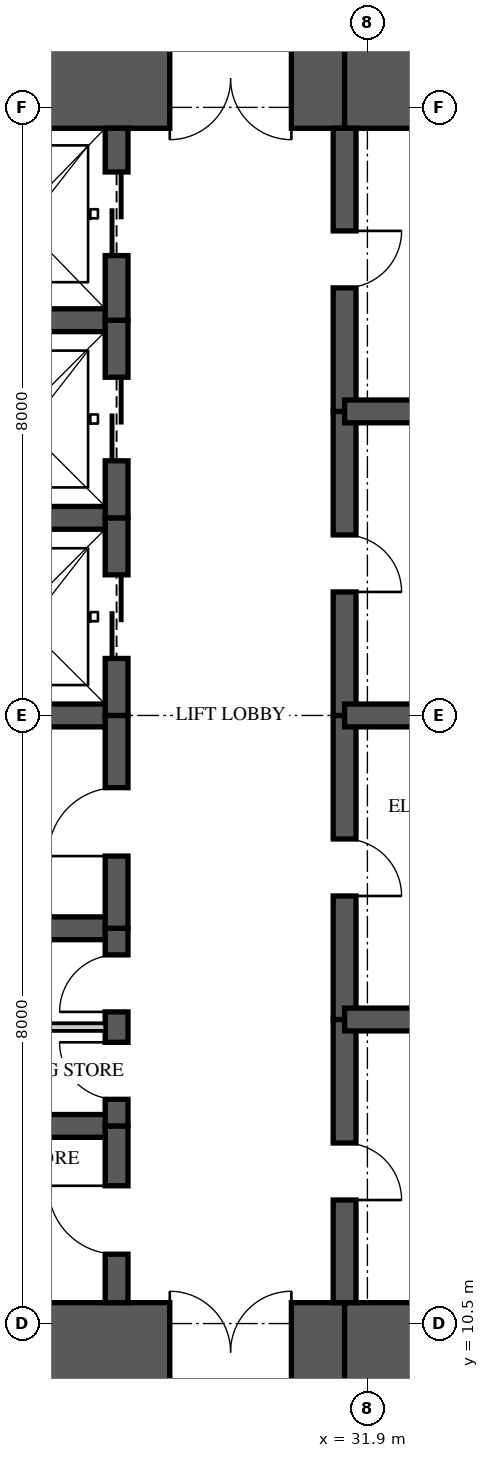
"""IFC4 building model, lengths in metres.
Left out: names, types, materials, properties, quantities, classifications, styles, units other than length and angle.
Written with IfcOpenShell. Run it as: python <this file> out.ifc"""

import sys

from ifc_helpers import new_model, si_unit, direction, frame, frame_2d, origin, place, context, subcontext, project, spatial, rectangle, extrude, element, fill, save


model = new_model("IFC4")
c1 = context("Model", 3, precision=1e-05, world=origin(), true_north=direction((0.0, 1.0)))
c2 = subcontext(c1, "Body", "Model", "MODEL_VIEW")
j1 = project(units=[si_unit("LENGTHUNIT", "METRE"), si_unit("PLANEANGLEUNIT", "RADIAN")], contexts=[c1])
p1 = place(None, origin())
s1 = spatial("IfcSite", under=j1, at=p1, CompositionType="ELEMENT")
p2 = place(p1, origin())
s2 = spatial("IfcBuilding", under=s1, at=p2, CompositionType="ELEMENT")
p3 = place(p2, frame((0.0, 0.0, 201.25)))
s3 = spatial("IfcBuildingStorey", under=s2, at=p3, CompositionType="ELEMENT", Elevation=201.25)
p4 = place(p3, frame((26.0, 10.125, 0.0), z_axis=(0.0, 0.0, 1.0), x_axis=(1.0, 0.0, 0.0)))
e1 = element("IfcWall", 1, at=p4, inside=s3, PredefinedType="SHEAR", context=c2, shape_type="SweptSolid", body=[
    extrude(rectangle(XDim=5.6, YDim=1.3, at=frame_2d((2.8, 0.0))), origin(), (0.0, 0.0, 1.0), 3.35),
])
p5 = place(p4, frame((3.3, 0.0, 0.0)))
e2 = element("IfcOpeningElement", 2, at=p5, cuts=e1, PredefinedType="OPENING", context=c2, shape_type="SweptSolid", body=[
    extrude(rectangle(XDim=1.6, YDim=2.1, at=frame_2d((0.8, 1.05))), frame((0.0, 0.66, 0.0), z_axis=(0.0, -1.0, 0.0), x_axis=(1.0, 0.0, 0.0)), (0.0, 0.0, 1.0), 1.32),
])
for number, where, z_axis, x_axis in (
    (3, (31.6, 10.125, 0.0), (0.0, 0.0, 1.0), (1.0, 0.0, 0.0)),
    (4, (35.9, 26.875, 0.0), (0.0, 0.0, 1.0), (-1.0, 0.0, 0.0)),
):
    element("IfcWall", number, at=place(p3, frame(where, z_axis=z_axis, x_axis=x_axis)), inside=s3, PredefinedType="SHEAR", context=c2, shape_type="SweptSolid", body=[
        extrude(rectangle(XDim=4.3, YDim=1.3, at=frame_2d((2.15, 0.0))), origin(), (0.0, 0.0, 1.0), 3.35),
    ])
p6 = place(p3, frame((31.6, 26.875, 0.0), z_axis=(0.0, 0.0, 1.0), x_axis=(-1.0, 0.0, 0.0)))
e5 = element("IfcWall", 5, at=p6, inside=s3, PredefinedType="SHEAR", context=c2, shape_type="SweptSolid", body=[
    extrude(rectangle(XDim=5.6, YDim=1.3, at=frame_2d((2.8, 0.0))), origin(), (0.0, 0.0, 1.0), 3.35),
])
p7 = place(p6, frame((0.7, 0.0, 0.0)))
e6 = element("IfcOpeningElement", 6, at=p7, cuts=e5, PredefinedType="OPENING", context=c2, shape_type="SweptSolid", body=[
    extrude(rectangle(XDim=1.6, YDim=2.1, at=frame_2d((0.8, 1.05))), frame((0.0, 0.66, 0.0), z_axis=(0.0, -1.0, 0.0), x_axis=(1.0, 0.0, 0.0)), (0.0, 0.0, 1.0), 1.32),
])
p8 = place(p3, frame((28.6, 10.775, 0.0), z_axis=(0.0, 0.0, 1.0), x_axis=(0.0, 1.0, 0.0)))
e7 = element("IfcWall", 7, at=p8, inside=s3, PredefinedType="SHEAR", context=c2, shape_type="SweptSolid", body=[
    extrude(rectangle(XDim=2.325, YDim=0.3, at=frame_2d((1.163, 0.0))), origin(), (0.0, 0.0, 1.0), 3.35),
])
p9 = place(p8, frame((0.637, 0.0, 0.0)))
e8 = element("IfcOpeningElement", 8, at=p9, cuts=e7, PredefinedType="OPENING", context=c2, shape_type="SweptSolid", body=[
    extrude(rectangle(XDim=0.9, YDim=2.1, at=frame_2d((0.45, 1.05))), frame((0.0, 0.16, 0.0), z_axis=(0.0, -1.0, 0.0), x_axis=(1.0, 0.0, 0.0)), (0.0, 0.0, 1.0), 0.32),
])
p10 = place(p3, frame((28.6, 13.1, 0.0), z_axis=(0.0, 0.0, 1.0), x_axis=(0.0, 1.0, 0.0)))
e9 = element("IfcWall", 9, at=p10, inside=s3, PredefinedType="SHEAR", context=c2, shape_type="SweptSolid", body=[
    extrude(rectangle(XDim=2.6, YDim=0.3, at=frame_2d((1.3, 0.0))), origin(), (0.0, 0.0, 1.0), 3.35),
])
p11 = place(p10, frame((0.35, 0.0, 0.0)))
e10 = element("IfcOpeningElement", 10, at=p11, cuts=e9, PredefinedType="OPENING", context=c2, shape_type="SweptSolid", body=[
    extrude(rectangle(XDim=0.75, YDim=2.1, at=frame_2d((0.375, 1.05))), frame((0.0, 0.16, 0.0), z_axis=(0.0, -1.0, 0.0), x_axis=(1.0, 0.0, 0.0)), (0.0, 0.0, 1.0), 0.32),
])
p12 = place(p10, frame((1.5, 0.0, 0.0)))
e11 = element("IfcOpeningElement", 11, at=p12, cuts=e9, PredefinedType="OPENING", context=c2, shape_type="SweptSolid", body=[
    extrude(rectangle(XDim=0.75, YDim=2.1, at=frame_2d((0.375, 1.05))), frame((0.0, 0.16, 0.0), z_axis=(0.0, -1.0, 0.0), x_axis=(1.0, 0.0, 0.0)), (0.0, 0.0, 1.0), 0.32),
])
p13 = place(p3, frame((28.6, 15.7, 0.0), z_axis=(0.0, 0.0, 1.0), x_axis=(0.0, 1.0, 0.0)))
e12 = element("IfcWall", 12, at=p13, inside=s3, PredefinedType="SHEAR", context=c2, shape_type="SweptSolid", body=[
    extrude(rectangle(XDim=2.8, YDim=0.3, at=frame_2d((1.4, 0.0))), origin(), (0.0, 0.0, 1.0), 3.35),
])
p14 = place(p13, frame((0.95, 0.0, 0.0)))
e13 = element("IfcOpeningElement", 13, at=p14, cuts=e12, PredefinedType="OPENING", context=c2, shape_type="SweptSolid", body=[
    extrude(rectangle(XDim=0.9, YDim=2.1, at=frame_2d((0.45, 1.05))), frame((0.0, 0.16, 0.0), z_axis=(0.0, -1.0, 0.0), x_axis=(1.0, 0.0, 0.0)), (0.0, 0.0, 1.0), 0.32),
])
p15 = place(p3, frame((28.6, 18.5, 0.0), z_axis=(0.0, 0.0, 1.0), x_axis=(0.0, 1.0, 0.0)))
e14 = element("IfcWall", 14, at=p15, inside=s3, PredefinedType="SHEAR", context=c2, shape_type="SweptSolid", body=[
    extrude(rectangle(XDim=2.6, YDim=0.3, at=frame_2d((1.3, 0.0))), origin(), (0.0, 0.0, 1.0), 3.35),
])
p16 = place(p15, frame((0.75, 0.0, 0.0)))
e15 = element("IfcOpeningElement", 15, at=p16, cuts=e14, PredefinedType="OPENING", context=c2, shape_type="SweptSolid", body=[
    extrude(rectangle(XDim=1.1, YDim=2.1, at=frame_2d((0.55, 1.05))), frame((0.0, 0.16, 0.0), z_axis=(0.0, -1.0, 0.0), x_axis=(1.0, 0.0, 0.0)), (0.0, 0.0, 1.0), 0.32),
])
p17 = place(p3, frame((28.6, 21.1, 0.0), z_axis=(0.0, 0.0, 1.0), x_axis=(0.0, 1.0, 0.0)))
e16 = element("IfcWall", 16, at=p17, inside=s3, PredefinedType="SHEAR", context=c2, shape_type="SweptSolid", body=[
    extrude(rectangle(XDim=2.6, YDim=0.3, at=frame_2d((1.3, 0.0))), origin(), (0.0, 0.0, 1.0), 3.35),
])
p18 = place(p17, frame((0.75, 0.0, 0.0)))
e17 = element("IfcOpeningElement", 17, at=p18, cuts=e16, PredefinedType="OPENING", context=c2, shape_type="SweptSolid", body=[
    extrude(rectangle(XDim=1.1, YDim=2.1, at=frame_2d((0.55, 1.05))), frame((0.0, 0.16, 0.0), z_axis=(0.0, -1.0, 0.0), x_axis=(1.0, 0.0, 0.0)), (0.0, 0.0, 1.0), 0.32),
])
p19 = place(p3, frame((28.6, 23.7, 0.0), z_axis=(0.0, 0.0, 1.0), x_axis=(0.0, 1.0, 0.0)))
e18 = element("IfcWall", 18, at=p19, inside=s3, PredefinedType="SHEAR", context=c2, shape_type="SweptSolid", body=[
    extrude(rectangle(XDim=2.525, YDim=0.3, at=frame_2d((1.263, 0.0))), origin(), (0.0, 0.0, 1.0), 3.35),
])
p20 = place(p19, frame((0.85, 0.0, 0.0)))
e19 = element("IfcOpeningElement", 19, at=p20, cuts=e18, PredefinedType="OPENING", context=c2, shape_type="SweptSolid", body=[
    extrude(rectangle(XDim=1.1, YDim=2.1, at=frame_2d((0.55, 1.05))), frame((0.0, 0.16, 0.0), z_axis=(0.0, -1.0, 0.0), x_axis=(1.0, 0.0, 0.0)), (0.0, 0.0, 1.0), 0.32),
])
p21 = place(p3, frame((31.6, 10.775, 0.0), z_axis=(0.0, 0.0, 1.0), x_axis=(0.0, 1.0, 0.0)))
e20 = element("IfcWall", 20, at=p21, inside=s3, PredefinedType="SHEAR", context=c2, shape_type="SweptSolid", body=[
    extrude(rectangle(XDim=3.725, YDim=0.3, at=frame_2d((1.863, 0.0))), origin(), (0.0, 0.0, 1.0), 3.35),
])
p22 = place(p21, frame((1.35, 0.0, 0.0)))
e21 = element("IfcOpeningElement", 21, at=p22, cuts=e20, PredefinedType="OPENING", context=c2, shape_type="SweptSolid", body=[
    extrude(rectangle(XDim=0.75, YDim=2.1, at=frame_2d((0.375, 1.05))), frame((0.0, 0.16, 0.0), z_axis=(0.0, -1.0, 0.0), x_axis=(1.0, 0.0, 0.0)), (0.0, 0.0, 1.0), 0.32),
])
p23 = place(p3, frame((31.6, 14.5, 0.0), z_axis=(0.0, 0.0, 1.0), x_axis=(0.0, 1.0, 0.0)))
e22 = element("IfcWall", 22, at=p23, inside=s3, PredefinedType="SHEAR", context=c2, shape_type="SweptSolid", body=[
    extrude(rectangle(XDim=4.0, YDim=0.3, at=frame_2d((2.0, 0.0))), origin(), (0.0, 0.0, 1.0), 3.35),
])
p24 = place(p23, frame((1.625, 0.0, 0.0)))
e23 = element("IfcOpeningElement", 23, at=p24, cuts=e22, PredefinedType="OPENING", context=c2, shape_type="SweptSolid", body=[
    extrude(rectangle(XDim=0.75, YDim=2.1, at=frame_2d((0.375, 1.05))), frame((0.0, 0.16, 0.0), z_axis=(0.0, -1.0, 0.0), x_axis=(1.0, 0.0, 0.0)), (0.0, 0.0, 1.0), 0.32),
])
p25 = place(p3, frame((31.6, 18.5, 0.0), z_axis=(0.0, 0.0, 1.0), x_axis=(0.0, 1.0, 0.0)))
e24 = element("IfcWall", 24, at=p25, inside=s3, PredefinedType="SHEAR", context=c2, shape_type="SweptSolid", body=[
    extrude(rectangle(XDim=4.0, YDim=0.3, at=frame_2d((2.0, 0.0))), origin(), (0.0, 0.0, 1.0), 3.35),
])
p26 = place(p25, frame((1.625, 0.0, 0.0)))
e25 = element("IfcOpeningElement", 25, at=p26, cuts=e24, PredefinedType="OPENING", context=c2, shape_type="SweptSolid", body=[
    extrude(rectangle(XDim=0.75, YDim=2.1, at=frame_2d((0.375, 1.05))), frame((0.0, 0.16, 0.0), z_axis=(0.0, -1.0, 0.0), x_axis=(1.0, 0.0, 0.0)), (0.0, 0.0, 1.0), 0.32),
])
p27 = place(p3, frame((31.6, 22.5, 0.0), z_axis=(0.0, 0.0, 1.0), x_axis=(0.0, 1.0, 0.0)))
e26 = element("IfcWall", 26, at=p27, inside=s3, PredefinedType="SHEAR", context=c2, shape_type="SweptSolid", body=[
    extrude(rectangle(XDim=3.725, YDim=0.3, at=frame_2d((1.863, 0.0))), origin(), (0.0, 0.0, 1.0), 3.35),
])
p28 = place(p27, frame((1.625, 0.0, 0.0)))
e27 = element("IfcOpeningElement", 27, at=p28, cuts=e26, PredefinedType="OPENING", context=c2, shape_type="SweptSolid", body=[
    extrude(rectangle(XDim=0.75, YDim=2.1, at=frame_2d((0.375, 1.05))), frame((0.0, 0.16, 0.0), z_axis=(0.0, -1.0, 0.0), x_axis=(1.0, 0.0, 0.0)), (0.0, 0.0, 1.0), 0.32),
])
for number, where, z_axis, x_axis in (
    (28, (26.0, 13.1, 0.0), (0.0, 0.0, 1.0), (1.0, 0.0, 0.0)),
    (29, (26.0, 15.7, 0.0), (0.0, 0.0, 1.0), (1.0, 0.0, 0.0)),
    (30, (26.0, 18.5, 0.0), (0.0, 0.0, 1.0), (1.0, 0.0, 0.0)),
    (31, (26.0, 21.1, 0.0), (0.0, 0.0, 1.0), (1.0, 0.0, 0.0)),
    (32, (26.0, 23.7, 0.0), (0.0, 0.0, 1.0), (1.0, 0.0, 0.0)),
):
    element("IfcWall", number, at=place(p3, frame(where, z_axis=z_axis, x_axis=x_axis)), inside=s3, PredefinedType="SHEAR", context=c2, shape_type="SweptSolid", body=[
        extrude(rectangle(XDim=2.6, YDim=0.3, at=frame_2d((1.3, 0.0))), origin(), (0.0, 0.0, 1.0), 3.35),
    ])
for number, where, z_axis, x_axis in (
    (33, (31.6, 14.5, 0.0), (0.0, 0.0, 1.0), (1.0, 0.0, 0.0)),
    (34, (31.6, 18.5, 0.0), (0.0, 0.0, 1.0), (1.0, 0.0, 0.0)),
    (35, (31.6, 22.5, 0.0), (0.0, 0.0, 1.0), (1.0, 0.0, 0.0)),
):
    element("IfcWall", number, at=place(p3, frame(where, z_axis=z_axis, x_axis=x_axis)), inside=s3, PredefinedType="SHEAR", context=c2, shape_type="SweptSolid", body=[
        extrude(rectangle(XDim=4.3, YDim=0.3, at=frame_2d((2.15, 0.0))), origin(), (0.0, 0.0, 1.0), 3.35),
    ])
p29 = place(p3, frame((26.15, 14.4, 0.0), z_axis=(0.0, 0.0, 1.0), x_axis=(1.0, 0.0, 0.0)))
e36 = element("IfcWall", 36, at=p29, inside=s3, PredefinedType="PARTITIONING", context=c2, shape_type="SweptSolid", body=[
    extrude(rectangle(XDim=2.3, YDim=0.1, at=frame_2d((1.15, 0.0))), origin(), (0.0, 0.0, 1.0), 3.11),
])
p30 = place(p16, origin())
e37 = element("IfcDoor", 37, at=p30, inside=s3, OperationType="SLIDING_TO_LEFT", PredefinedType="DOOR", context=c2, shape_type="SweptSolid", body=[
    extrude(rectangle(XDim=1.1, YDim=2.1, at=frame_2d((0.55, 1.05))), frame((0.0, 0.025, 0.0), z_axis=(0.0, -1.0, 0.0), x_axis=(1.0, 0.0, 0.0)), (0.0, 0.0, 1.0), 0.05),
])
fill(e15, e37)
p31 = place(p18, origin())
e38 = element("IfcDoor", 38, at=p31, inside=s3, OperationType="SLIDING_TO_LEFT", PredefinedType="DOOR", context=c2, shape_type="SweptSolid", body=[
    extrude(rectangle(XDim=1.1, YDim=2.1, at=frame_2d((0.55, 1.05))), frame((0.0, 0.025, 0.0), z_axis=(0.0, -1.0, 0.0), x_axis=(1.0, 0.0, 0.0)), (0.0, 0.0, 1.0), 0.05),
])
fill(e17, e38)
p32 = place(p20, origin())
e39 = element("IfcDoor", 39, at=p32, inside=s3, OperationType="SLIDING_TO_LEFT", PredefinedType="DOOR", context=c2, shape_type="SweptSolid", body=[
    extrude(rectangle(XDim=1.1, YDim=2.1, at=frame_2d((0.55, 1.05))), frame((0.0, 0.025, 0.0), z_axis=(0.0, -1.0, 0.0), x_axis=(1.0, 0.0, 0.0)), (0.0, 0.0, 1.0), 0.05),
])
fill(e19, e39)
p33 = place(p9, origin())
e40 = element("IfcDoor", 40, at=p33, inside=s3, OperationType="SINGLE_SWING_RIGHT", PredefinedType="DOOR", context=c2, shape_type="SweptSolid", body=[
    extrude(rectangle(XDim=0.9, YDim=2.1, at=frame_2d((0.45, 1.05))), frame((0.0, 0.025, 0.0), z_axis=(0.0, -1.0, 0.0), x_axis=(1.0, 0.0, 0.0)), (0.0, 0.0, 1.0), 0.05),
])
fill(e8, e40)
p34 = place(p11, origin())
e41 = element("IfcDoor", 41, at=p34, inside=s3, OperationType="SINGLE_SWING_RIGHT", PredefinedType="DOOR", context=c2, shape_type="SweptSolid", body=[
    extrude(rectangle(XDim=0.75, YDim=2.1, at=frame_2d((0.375, 1.05))), frame((0.0, 0.025, 0.0), z_axis=(0.0, -1.0, 0.0), x_axis=(1.0, 0.0, 0.0)), (0.0, 0.0, 1.0), 0.05),
])
fill(e10, e41)
p35 = place(p12, origin())
e42 = element("IfcDoor", 42, at=p35, inside=s3, OperationType="SINGLE_SWING_LEFT", PredefinedType="DOOR", context=c2, shape_type="SweptSolid", body=[
    extrude(rectangle(XDim=0.75, YDim=2.1, at=frame_2d((0.375, 1.05))), frame((0.0, 0.025, 0.0), z_axis=(0.0, -1.0, 0.0), x_axis=(1.0, 0.0, 0.0)), (0.0, 0.0, 1.0), 0.05),
])
fill(e11, e42)
p36 = place(p14, origin())
e43 = element("IfcDoor", 43, at=p36, inside=s3, OperationType="SINGLE_SWING_LEFT", PredefinedType="DOOR", context=c2, shape_type="SweptSolid", body=[
    extrude(rectangle(XDim=0.9, YDim=2.1, at=frame_2d((0.45, 1.05))), frame((0.0, 0.025, 0.0), z_axis=(0.0, -1.0, 0.0), x_axis=(1.0, 0.0, 0.0)), (0.0, 0.0, 1.0), 0.05),
])
fill(e13, e43)
p37 = place(p5, origin())
e44 = element("IfcDoor", 44, at=p37, inside=s3, OperationType="DOUBLE_DOOR_SINGLE_SWING", PredefinedType="DOOR", context=c2, shape_type="SweptSolid", body=[
    extrude(rectangle(XDim=1.6, YDim=2.1, at=frame_2d((0.8, 1.05))), frame((0.0, 0.025, 0.0), z_axis=(0.0, -1.0, 0.0), x_axis=(1.0, 0.0, 0.0)), (0.0, 0.0, 1.0), 0.05),
])
fill(e2, e44)
p38 = place(p7, origin())
e45 = element("IfcDoor", 45, at=p38, inside=s3, OperationType="DOUBLE_DOOR_SINGLE_SWING", PredefinedType="DOOR", context=c2, shape_type="SweptSolid", body=[
    extrude(rectangle(XDim=1.6, YDim=2.1, at=frame_2d((0.8, 1.05))), frame((0.0, 0.025, 0.0), z_axis=(0.0, -1.0, 0.0), x_axis=(1.0, 0.0, 0.0)), (0.0, 0.0, 1.0), 0.05),
])
fill(e6, e45)
p39 = place(p22, frame((0.75, 0.0, 0.0), z_axis=(0.0, 0.0, 1.0), x_axis=(-1.0, 0.0, 0.0)))
e46 = element("IfcDoor", 46, at=p39, inside=s3, OperationType="SINGLE_SWING_RIGHT", PredefinedType="DOOR", context=c2, shape_type="SweptSolid", body=[
    extrude(rectangle(XDim=0.75, YDim=2.1, at=frame_2d((0.375, 1.05))), frame((0.0, 0.025, 0.0), z_axis=(0.0, -1.0, 0.0), x_axis=(1.0, 0.0, 0.0)), (0.0, 0.0, 1.0), 0.05),
])
fill(e21, e46)
p40 = place(p24, frame((0.75, 0.0, 0.0), z_axis=(0.0, 0.0, 1.0), x_axis=(-1.0, 0.0, 0.0)))
e47 = element("IfcDoor", 47, at=p40, inside=s3, OperationType="SINGLE_SWING_RIGHT", PredefinedType="DOOR", context=c2, shape_type="SweptSolid", body=[
    extrude(rectangle(XDim=0.75, YDim=2.1, at=frame_2d((0.375, 1.05))), frame((0.0, 0.025, 0.0), z_axis=(0.0, -1.0, 0.0), x_axis=(1.0, 0.0, 0.0)), (0.0, 0.0, 1.0), 0.05),
])
fill(e23, e47)
p41 = place(p26, frame((0.75, 0.0, 0.0), z_axis=(0.0, 0.0, 1.0), x_axis=(-1.0, 0.0, 0.0)))
e48 = element("IfcDoor", 48, at=p41, inside=s3, OperationType="SINGLE_SWING_RIGHT", PredefinedType="DOOR", context=c2, shape_type="SweptSolid", body=[
    extrude(rectangle(XDim=0.75, YDim=2.1, at=frame_2d((0.375, 1.05))), frame((0.0, 0.025, 0.0), z_axis=(0.0, -1.0, 0.0), x_axis=(1.0, 0.0, 0.0)), (0.0, 0.0, 1.0), 0.05),
])
fill(e25, e48)
p42 = place(p28, frame((0.75, 0.0, 0.0), z_axis=(0.0, 0.0, 1.0), x_axis=(-1.0, 0.0, 0.0)))
e49 = element("IfcDoor", 49, at=p42, inside=s3, OperationType="SINGLE_SWING_LEFT", PredefinedType="DOOR", context=c2, shape_type="SweptSolid", body=[
    extrude(rectangle(XDim=0.75, YDim=2.1, at=frame_2d((0.375, 1.05))), frame((0.0, 0.025, 0.0), z_axis=(0.0, -1.0, 0.0), x_axis=(1.0, 0.0, 0.0)), (0.0, 0.0, 1.0), 0.05),
])
fill(e27, e49)
save(model, sys.argv[1])
